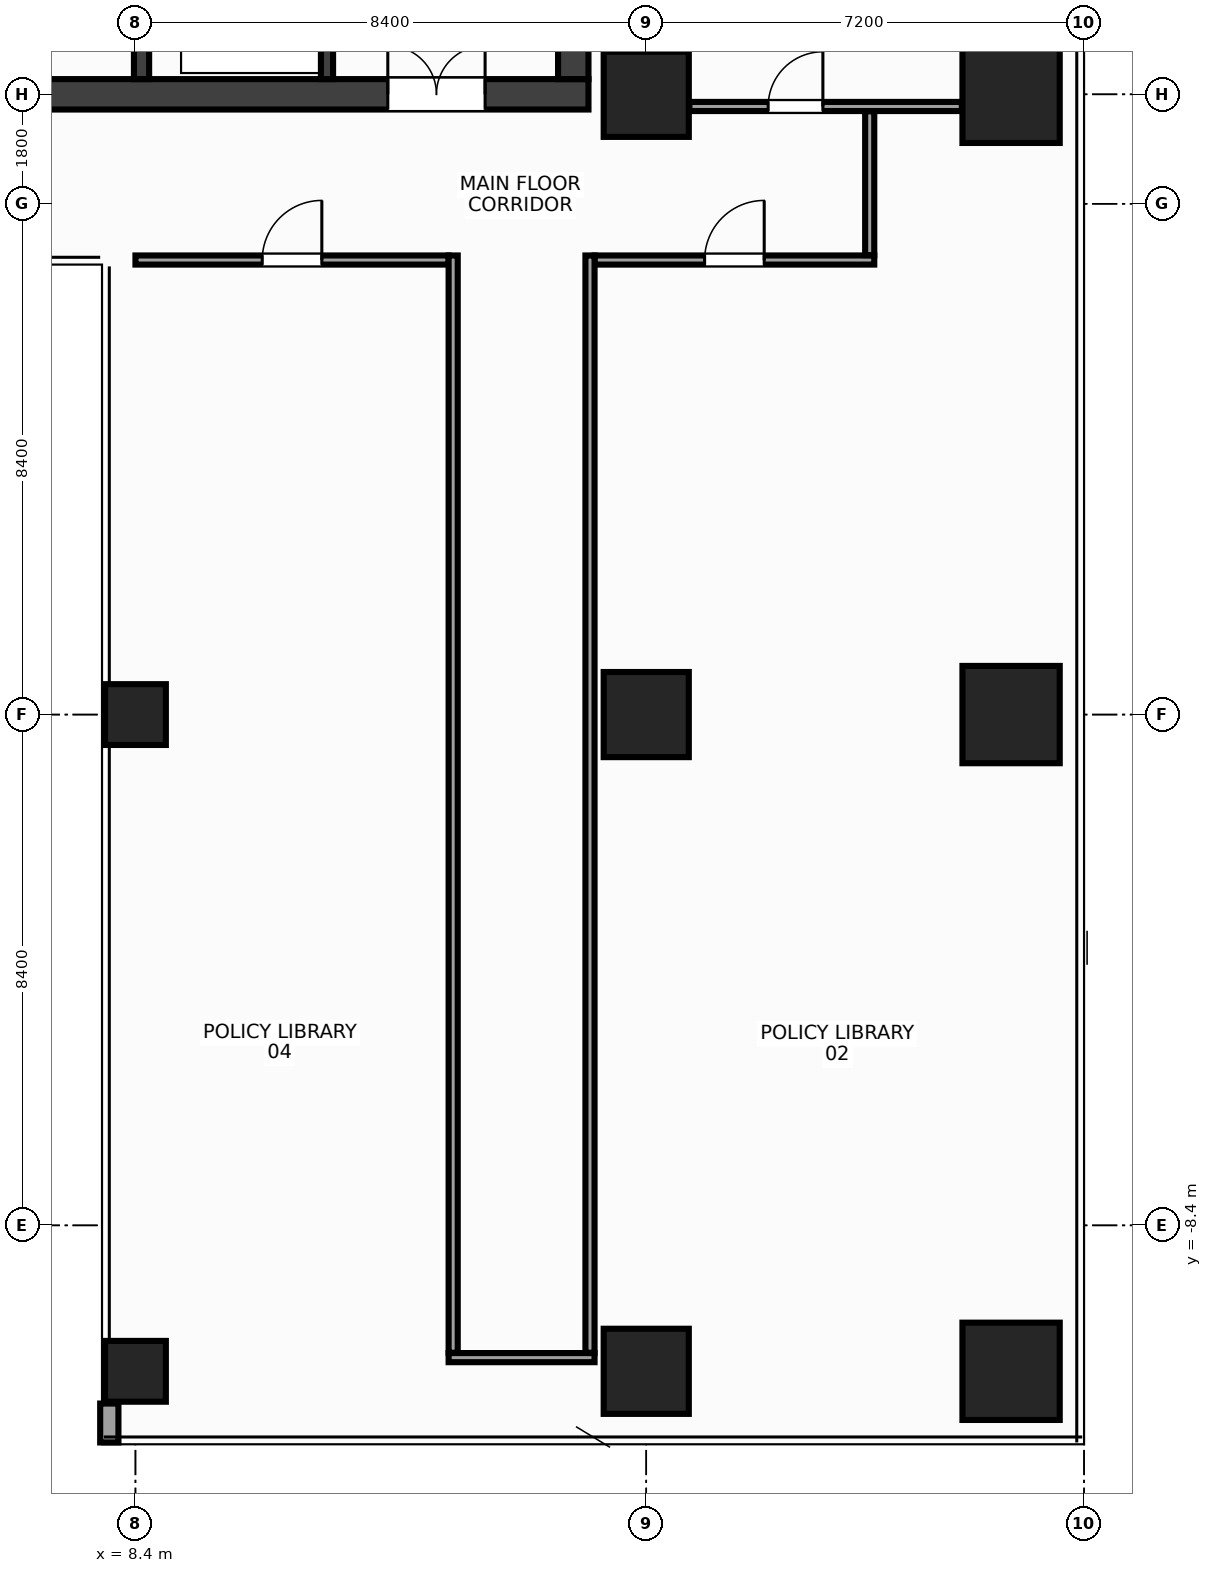
"""IFC4 building model, lengths in metres.
Left out: names, types, materials, properties, quantities, classifications, styles, units other than length and angle.
Written with IfcOpenShell. Run it as: python <this file> out.ifc"""

import sys

from ifc_helpers import new_model, si_unit, direction, frame, frame_2d, origin, origin_2d, place, context, subcontext, project, spatial, rectangle, hollow_rectangle, extrude, source, transform, mapped, element, fill, save


model = new_model("IFC4")
c1 = context("Model", 3, precision=1e-05, world=origin(), true_north=direction((0.0, 1.0)))
c2 = subcontext(c1, "Body", "Model", "MODEL_VIEW")
j1 = project(units=[si_unit("LENGTHUNIT", "METRE"), si_unit("PLANEANGLEUNIT", "RADIAN")], contexts=[c1])
p1 = place(None, origin())
s1 = spatial("IfcSite", under=j1, at=p1, CompositionType="ELEMENT")
p2 = place(p1, origin())
s2 = spatial("IfcBuilding", under=s1, at=p2, CompositionType="ELEMENT")
p3 = place(p2, frame((0.0, 0.0, 207.2)))
s3 = spatial("IfcBuildingStorey", under=s2, at=p3, CompositionType="ELEMENT", Elevation=207.2)
m1 = source(origin(), c2, "Body", "SweptSolid", [
    extrude(rectangle(XDim=31.7, YDim=0.5, at=frame_2d((15.85, 0.0))), origin(), (0.0, 0.0, 1.0), 3.6),
])
p4 = place(p3, frame((-15.85, 10.2, 0.0), z_axis=(0.0, 0.0, 1.0), x_axis=(1.0, 0.0, 0.0)))
e1 = element("IfcWall", 1, at=p4, inside=s3, PredefinedType="SHEAR", context=c2, shape_type="MappedRepresentation", body=[
    mapped(m1, transform((0.0, 0.0, 0.0), x_axis=(1.0, 0.0, 0.0), y_axis=(0.0, 1.0, 0.0), z_axis=(0.0, 0.0, 1.0), scale=1.0)),
])
p5 = place(p4, frame((1.7, 0.0, 0.0)))
e2 = element("IfcOpeningElement", 2, at=p5, cuts=e1, PredefinedType="OPENING", context=c2, shape_type="SweptSolid", body=[
    extrude(rectangle(XDim=1.6, YDim=2.15, at=frame_2d((0.8, 1.075))), frame((0.0, 0.262, 0.0), z_axis=(0.0, -1.0, 0.0), x_axis=(1.0, 0.0, 0.0)), (0.0, 0.0, 1.0), 0.524),
])
p6 = place(p4, frame((28.4, 0.0, 0.0)))
e3 = element("IfcOpeningElement", 3, at=p6, cuts=e1, PredefinedType="OPENING", context=c2, shape_type="SweptSolid", body=[
    extrude(rectangle(XDim=1.6, YDim=2.15, at=frame_2d((0.8, 1.075))), frame((0.0, 0.262, 0.0), z_axis=(0.0, -1.0, 0.0), x_axis=(1.0, 0.0, 0.0)), (0.0, 0.0, 1.0), 0.524),
])
p7 = place(p4, frame((15.1, 0.0, 0.0)))
e4 = element("IfcOpeningElement", 4, at=p7, cuts=e1, PredefinedType="OPENING", context=c2, shape_type="SweptSolid", body=[
    extrude(rectangle(XDim=1.5, YDim=2.2, at=frame_2d((0.75, 1.1))), frame((0.0, 0.262, 0.0), z_axis=(0.0, -1.0, 0.0), x_axis=(1.0, 0.0, 0.0)), (0.0, 0.0, 1.0), 0.524),
])
m2 = source(origin(), c2, "Body", "SweptSolid", [
    extrude(rectangle(XDim=13.1, YDim=0.5, at=frame_2d((6.55, 0.0))), origin(), (0.0, 0.0, 1.0), 3.6),
])
p8 = place(p3, frame((15.6, 10.45, 0.0), z_axis=(0.0, 0.0, 1.0), x_axis=(0.0, 1.0, 0.0)))
e5 = element("IfcWall", 5, at=p8, inside=s3, PredefinedType="SHEAR", context=c2, shape_type="MappedRepresentation", body=[
    mapped(m2, transform((0.0, 0.0, 0.0), x_axis=(1.0, 0.0, 0.0), y_axis=(0.0, 1.0, 0.0), z_axis=(0.0, 0.0, 1.0), scale=1.0)),
])
m3 = source(origin(), c2, "Body", "SweptSolid", [
    extrude(rectangle(XDim=13.1, YDim=0.25, at=frame_2d((6.55, 0.0))), origin(), (0.0, 0.0, 1.0), 3.6),
])
p9 = place(p3, frame((8.5, 10.45, 0.0), z_axis=(0.0, 0.0, 1.0), x_axis=(0.0, 1.0, 0.0)))
e6 = element("IfcWall", 6, at=p9, inside=s3, PredefinedType="SHEAR", context=c2, shape_type="MappedRepresentation", body=[
    mapped(m3, transform((0.0, 0.0, 0.0), x_axis=(1.0, 0.0, 0.0), y_axis=(0.0, 1.0, 0.0), z_axis=(0.0, 0.0, 1.0), scale=1.0)),
])
p10 = place(p9, frame((10.0, 0.0, 0.0)))
e7 = element("IfcOpeningElement", 7, at=p10, cuts=e6, PredefinedType="OPENING", context=c2, shape_type="SweptSolid", body=[
    extrude(rectangle(XDim=0.95, YDim=2.15, at=frame_2d((0.475, 1.075))), frame((0.0, 0.137, 0.0), z_axis=(0.0, -1.0, 0.0), x_axis=(1.0, 0.0, 0.0)), (0.0, 0.0, 1.0), 0.274),
])
m4 = source(origin(), c2, "Body", "SweptSolid", [
    extrude(rectangle(XDim=3.2, YDim=0.2, at=frame_2d((1.6, 0.0))), origin(), (0.0, 0.0, 1.0), 3.6),
])
p11 = place(p3, frame((11.55, 10.45, 0.0), z_axis=(0.0, 0.0, 1.0), x_axis=(0.0, 1.0, 0.0)))
e8 = element("IfcWall", 8, at=p11, inside=s3, PredefinedType="SHEAR", context=c2, shape_type="MappedRepresentation", body=[
    mapped(m4, transform((0.0, 0.0, 0.0), x_axis=(1.0, 0.0, 0.0), y_axis=(0.0, 1.0, 0.0), z_axis=(0.0, 0.0, 1.0), scale=1.0)),
])
p12 = place(p11, frame((0.9, 0.0, 0.0)))
e9 = element("IfcOpeningElement", 9, at=p12, cuts=e8, PredefinedType="OPENING", context=c2, shape_type="SweptSolid", body=[
    extrude(rectangle(XDim=1.1, YDim=2.15, at=frame_2d((0.55, 1.075))), frame((0.0, 0.112, 0.0), z_axis=(0.0, -1.0, 0.0), x_axis=(1.0, 0.0, 0.0)), (0.0, 0.0, 1.0), 0.224),
])
m5 = source(origin(), c2, "Body", "SweptSolid", [
    extrude(rectangle(XDim=1.4, YDim=1.4, at=origin_2d()), origin(), (0.0, 0.0, 1.0), 3.6),
])
for number, where, z_axis, x_axis in (
    (10, (16.8, -10.8, 0.0), (0.0, 0.0, 1.0), (1.0, 0.0, 0.0)),
    (11, (16.8, 0.0, 0.0), (0.0, 0.0, 1.0), (1.0, 0.0, 0.0)),
    (12, (16.8, 10.2, 0.0), (0.0, 0.0, 1.0), (1.0, 0.0, 0.0)),
):
    element("IfcColumn", number, at=place(p3, frame(where, z_axis=z_axis, x_axis=x_axis)), inside=s3, PredefinedType="COLUMN", context=c2, shape_type="MappedRepresentation", body=[
        mapped(m5, transform((0.0, 0.0, 0.0), x_axis=(1.0, 0.0, 0.0), y_axis=(0.0, 1.0, 0.0), z_axis=(0.0, 0.0, 1.0), scale=1.0)),
    ])
m6 = source(origin(), c2, "Body", "SweptSolid", [
    extrude(rectangle(XDim=1.6, YDim=1.6, at=origin_2d()), origin(), (0.0, 0.0, 1.0), 3.6),
])
for number, where, z_axis, x_axis in (
    (13, (22.8, -10.8, 0.0), (0.0, 0.0, 1.0), (1.0, 0.0, 0.0)),
    (14, (22.8, 0.0, 0.0), (0.0, 0.0, 1.0), (1.0, 0.0, 0.0)),
    (15, (22.8, 10.2, 0.0), (0.0, 0.0, 1.0), (1.0, 0.0, 0.0)),
):
    element("IfcColumn", number, at=place(p3, frame(where, z_axis=z_axis, x_axis=x_axis)), inside=s3, PredefinedType="COLUMN", context=c2, shape_type="MappedRepresentation", body=[
        mapped(m6, transform((0.0, 0.0, 0.0), x_axis=(1.0, 0.0, 0.0), y_axis=(0.0, 1.0, 0.0), z_axis=(0.0, 0.0, 1.0), scale=1.0)),
    ])
m7 = source(origin(), c2, "Body", "SweptSolid", [
    extrude(hollow_rectangle(XDim=1.0, YDim=1.0, WallThickness=0.045, at=origin_2d()), origin(), (0.0, 0.0, 1.0), 3.6),
])
for number, where, z_axis, x_axis in (
    (16, (8.4, 0.0, 0.0), (0.0, 0.0, 1.0), (1.0, 0.0, 0.0)),
    (17, (8.4, -10.8, 0.0), (0.0, 0.0, 1.0), (1.0, 0.0, 0.0)),
):
    element("IfcColumn", number, at=place(p3, frame(where, z_axis=z_axis, x_axis=x_axis)), inside=s3, PredefinedType="COLUMN", context=c2, shape_type="MappedRepresentation", body=[
        mapped(m7, transform((0.0, 0.0, 0.0), x_axis=(1.0, 0.0, 0.0), y_axis=(0.0, 1.0, 0.0), z_axis=(0.0, 0.0, 1.0), scale=1.0)),
    ])
m8 = source(origin(), c2, "Body", "SweptSolid", [
    extrude(rectangle(XDim=0.64, YDim=0.24, at=frame_2d((0.32, 0.0))), origin(), (0.0, 0.0, 1.0), 2.76),
])
p13 = place(p3, frame((7.97, -11.33, 0.0), z_axis=(0.0, 0.0, 1.0), x_axis=(0.0, -1.0, 0.0)))
e18 = element("IfcWall", 18, at=p13, inside=s3, PredefinedType="STANDARD", context=c2, shape_type="MappedRepresentation", body=[
    mapped(m8, transform((0.0, 0.0, 0.0), x_axis=(1.0, 0.0, 0.0), y_axis=(0.0, 1.0, 0.0), z_axis=(0.0, 0.0, 1.0), scale=1.0)),
])
m9 = source(origin(), c2, "Body", "SweptSolid", [
    extrude(rectangle(XDim=4.48, YDim=0.15, at=frame_2d((2.24, 0.0))), origin(), (0.0, 0.0, 1.0), 2.915),
])
p14 = place(p3, frame((17.51, 10.0, 0.0), z_axis=(0.0, 0.0, 1.0), x_axis=(1.0, 0.0, 0.0)))
e19 = element("IfcWall", 19, at=p14, inside=s3, PredefinedType="PARTITIONING", context=c2, shape_type="MappedRepresentation", body=[
    mapped(m9, transform((0.0, 0.0, 0.0), x_axis=(1.0, 0.0, 0.0), y_axis=(0.0, 1.0, 0.0), z_axis=(0.0, 0.0, 1.0), scale=1.0)),
])
p15 = place(p14, frame((1.295, 0.0, 0.0)))
e20 = element("IfcOpeningElement", 20, at=p15, cuts=e19, PredefinedType="OPENING", context=c2, shape_type="SweptSolid", body=[
    extrude(rectangle(XDim=0.9, YDim=2.15, at=frame_2d((0.45, 1.075))), frame((0.0, 0.087, 0.0), z_axis=(0.0, -1.0, 0.0), x_axis=(1.0, 0.0, 0.0)), (0.0, 0.0, 1.0), 0.174),
])
m10 = source(origin(), c2, "Body", "SweptSolid", [
    extrude(rectangle(XDim=5.15, YDim=0.15, at=frame_2d((2.575, 0.0))), origin(), (0.0, 0.0, 1.0), 3.38),
])
p16 = place(p3, frame((8.4, 7.475, 0.0), z_axis=(0.0, 0.0, 1.0), x_axis=(1.0, 0.0, 0.0)))
e21 = element("IfcWall", 21, at=p16, inside=s3, PredefinedType="PARTITIONING", context=c2, shape_type="MappedRepresentation", body=[
    mapped(m10, transform((0.0, 0.0, 0.0), x_axis=(1.0, 0.0, 0.0), y_axis=(0.0, 1.0, 0.0), z_axis=(0.0, 0.0, 1.0), scale=1.0)),
])
p17 = place(p16, frame((2.085, 0.0, 0.0)))
e22 = element("IfcOpeningElement", 22, at=p17, cuts=e21, PredefinedType="OPENING", context=c2, shape_type="SweptSolid", body=[
    extrude(rectangle(XDim=0.98, YDim=2.15, at=frame_2d((0.49, 1.075))), frame((0.0, 0.087, 0.0), z_axis=(0.0, -1.0, 0.0), x_axis=(1.0, 0.0, 0.0)), (0.0, 0.0, 1.0), 0.174),
])
m11 = source(origin(), c2, "Body", "SweptSolid", [
    extrude(rectangle(XDim=4.6, YDim=0.15, at=frame_2d((2.3, 0.0))), origin(), (0.0, 0.0, 1.0), 2.765),
])
p18 = place(p3, frame((15.95, 7.475, 0.0), z_axis=(0.0, 0.0, 1.0), x_axis=(1.0, 0.0, 0.0)))
e23 = element("IfcWall", 23, at=p18, inside=s3, PredefinedType="PARTITIONING", context=c2, shape_type="MappedRepresentation", body=[
    mapped(m11, transform((0.0, 0.0, 0.0), x_axis=(1.0, 0.0, 0.0), y_axis=(0.0, 1.0, 0.0), z_axis=(0.0, 0.0, 1.0), scale=1.0)),
])
p19 = place(p18, frame((1.81, 0.0, 0.0)))
e24 = element("IfcOpeningElement", 24, at=p19, cuts=e23, PredefinedType="OPENING", context=c2, shape_type="SweptSolid", body=[
    extrude(rectangle(XDim=0.98, YDim=2.15, at=frame_2d((0.49, 1.075))), frame((0.0, 0.087, 0.0), z_axis=(0.0, -1.0, 0.0), x_axis=(1.0, 0.0, 0.0)), (0.0, 0.0, 1.0), 0.174),
])
m12 = source(origin(), c2, "Body", "SweptSolid", [
    extrude(rectangle(XDim=2.4, YDim=0.15, at=frame_2d((1.2, 0.0))), origin(), (0.0, 0.0, 1.0), 2.915),
])
p20 = place(p3, frame((13.55, -10.575, 0.0), z_axis=(0.0, 0.0, 1.0), x_axis=(1.0, 0.0, 0.0)))
e25 = element("IfcWall", 25, at=p20, inside=s3, PredefinedType="PARTITIONING", context=c2, shape_type="MappedRepresentation", body=[
    mapped(m12, transform((0.0, 0.0, 0.0), x_axis=(1.0, 0.0, 0.0), y_axis=(0.0, 1.0, 0.0), z_axis=(0.0, 0.0, 1.0), scale=1.0)),
])
m13 = source(origin(), c2, "Body", "SweptSolid", [
    extrude(rectangle(XDim=2.365, YDim=0.15, at=frame_2d((1.183, 0.0))), origin(), (0.0, 0.0, 1.0), 3.38),
])
p21 = place(p3, frame((20.475, 7.555, 0.0), z_axis=(0.0, 0.0, 1.0), x_axis=(0.0, 1.0, 0.0)))
e26 = element("IfcWall", 26, at=p21, inside=s3, PredefinedType="PARTITIONING", context=c2, shape_type="MappedRepresentation", body=[
    mapped(m13, transform((0.0, 0.0, 0.0), x_axis=(1.0, 0.0, 0.0), y_axis=(0.0, 1.0, 0.0), z_axis=(0.0, 0.0, 1.0), scale=1.0)),
])
m14 = source(origin(), c2, "Body", "SweptSolid", [
    extrude(rectangle(XDim=18.045, YDim=0.15, at=frame_2d((9.022, 0.0))), origin(), (0.0, 0.0, 1.0), 2.915),
])
for number, where, z_axis, x_axis in (
    (27, (13.625, -10.495, 0.0), (0.0, 0.0, 1.0), (0.0, 1.0, 0.0)),
    (28, (15.875, -10.495, 0.0), (0.0, 0.0, 1.0), (0.0, 1.0, 0.0)),
):
    element("IfcWall", number, at=place(p3, frame(where, z_axis=z_axis, x_axis=x_axis)), inside=s3, PredefinedType="PARTITIONING", context=c2, shape_type="MappedRepresentation", body=[
        mapped(m14, transform((0.0, 0.0, 0.0), x_axis=(1.0, 0.0, 0.0), y_axis=(0.0, 1.0, 0.0), z_axis=(0.0, 0.0, 1.0), scale=1.0)),
    ])
m15 = source(origin(), c2, "Body", "SweptSolid", [
    extrude(rectangle(XDim=1.6, YDim=2.15, at=frame_2d((0.8, 1.075))), frame((0.0, 0.025, 0.0), z_axis=(0.0, -1.0, 0.0), x_axis=(1.0, 0.0, 0.0)), (0.0, 0.0, 1.0), 0.05),
])
p22 = place(p6, origin())
e29 = element("IfcDoor", 29, at=p22, inside=s3, OperationType="DOUBLE_DOOR_SINGLE_SWING", PredefinedType="DOOR", context=c2, shape_type="MappedRepresentation", body=[
    mapped(m15, transform((0.0, 0.0, 0.0), x_axis=(1.0, 0.0, 0.0), y_axis=(0.0, 1.0, 0.0), z_axis=(0.0, 0.0, 1.0), scale=1.0)),
])
fill(e3, e29)
m16 = source(origin(), c2, "Body", "SweptSolid", [
    extrude(rectangle(XDim=0.9, YDim=2.15, at=frame_2d((0.45, 1.075))), frame((0.0, 0.025, 0.0), z_axis=(0.0, -1.0, 0.0), x_axis=(1.0, 0.0, 0.0)), (0.0, 0.0, 1.0), 0.05),
])
p23 = place(p15, origin())
e30 = element("IfcDoor", 30, at=p23, inside=s3, OperationType="SINGLE_SWING_RIGHT", PredefinedType="DOOR", context=c2, shape_type="MappedRepresentation", body=[
    mapped(m16, transform((0.0, 0.0, 0.0), x_axis=(1.0, 0.0, 0.0), y_axis=(0.0, 1.0, 0.0), z_axis=(0.0, 0.0, 1.0), scale=1.0)),
])
fill(e20, e30)
m17 = source(origin(), c2, "Body", "SweptSolid", [
    extrude(rectangle(XDim=0.98, YDim=2.15, at=frame_2d((0.49, 1.075))), frame((0.0, 0.025, 0.0), z_axis=(0.0, -1.0, 0.0), x_axis=(1.0, 0.0, 0.0)), (0.0, 0.0, 1.0), 0.05),
])
p24 = place(p19, origin())
e31 = element("IfcDoor", 31, at=p24, inside=s3, OperationType="SINGLE_SWING_RIGHT", PredefinedType="DOOR", context=c2, shape_type="MappedRepresentation", body=[
    mapped(m17, transform((0.0, 0.0, 0.0), x_axis=(1.0, 0.0, 0.0), y_axis=(0.0, 1.0, 0.0), z_axis=(0.0, 0.0, 1.0), scale=1.0)),
])
fill(e24, e31)
p25 = place(p17, origin())
e32 = element("IfcDoor", 32, at=p25, inside=s3, OperationType="SINGLE_SWING_RIGHT", PredefinedType="DOOR", context=c2, shape_type="MappedRepresentation", body=[
    mapped(m17, transform((0.0, 0.0, 0.0), x_axis=(1.0, 0.0, 0.0), y_axis=(0.0, 1.0, 0.0), z_axis=(0.0, 0.0, 1.0), scale=1.0)),
])
fill(e22, e32)
save(model, sys.argv[1])
